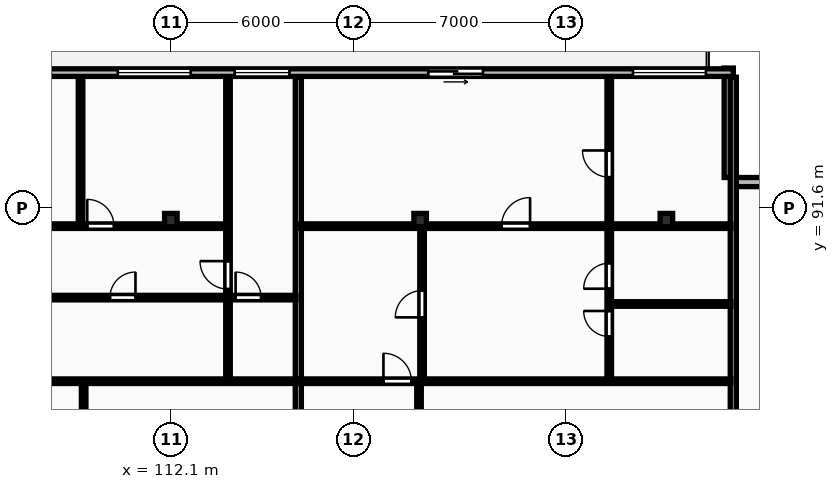
"""IFC4 building model, lengths in metres.
Left out: names, types, materials, properties, quantities, classifications, styles, units other than length and angle.
Written with IfcOpenShell. Run it as: python <this file> out.ifc"""

import sys

from ifc_helpers import new_model, si_unit, direction, frame, frame_2d, origin, origin_2d, place, context, subcontext, project, spatial, rectangle, i_section, extrude, element, fill, save


model = new_model("IFC4")
c1 = context("Model", 3, precision=1e-05, world=origin(), true_north=direction((0.0, 1.0)))
c2 = subcontext(c1, "Body", "Model", "MODEL_VIEW")
j1 = project(units=[si_unit("LENGTHUNIT", "METRE"), si_unit("PLANEANGLEUNIT", "RADIAN")], contexts=[c1])
p1 = place(None, origin())
s1 = spatial("IfcSite", under=j1, at=p1, CompositionType="ELEMENT")
p2 = place(p1, origin())
s2 = spatial("IfcBuilding", under=s1, at=p2, CompositionType="ELEMENT")
p3 = place(p2, frame((0.0, 0.0, 139.3)))
s3 = spatial("IfcBuildingStorey", under=s2, at=p3, CompositionType="ELEMENT", Elevation=139.3)
for number, where, z_axis, x_axis in (
    (1, (112.1, 91.2, 0.0), (0.0, 0.0, 1.0), (1.0, 0.0, 0.0)),
    (2, (120.3, 91.2, 0.0), (0.0, 0.0, 1.0), (1.0, 0.0, 0.0)),
    (3, (128.4, 91.2, 0.0), (0.0, 0.0, 1.0), (1.0, 0.0, 0.0)),
):
    element("IfcColumn", number, at=place(p3, frame(where, z_axis=z_axis, x_axis=x_axis)), inside=s3, PredefinedType="COLUMN", context=c2, shape_type="SweptSolid", body=[
        extrude(i_section(OverallWidth=0.412, OverallDepth=0.437, WebThickness=0.036, FlangeThickness=0.052, FilletRadius=0.015, at=origin_2d()), origin(), (0.0, 0.0, 1.0), 3.6),
    ])
for number, where, z_axis, x_axis in (
    (4, (134.2, 92.45, 0.0), (0.0, 0.0, 1.0), (-1.0, 0.0, 0.0)),
    (5, (130.45, 92.6, 0.0), (0.0, 0.0, 1.0), (0.0, 1.0, 0.0)),
):
    element("IfcWall", number, at=place(p3, frame(where, z_axis=z_axis, x_axis=x_axis)), inside=s3, PredefinedType="STANDARD", context=c2, shape_type="SweptSolid", body=[
        extrude(rectangle(XDim=3.6, YDim=0.3, at=frame_2d((1.8, 0.0))), origin(), (0.0, 0.0, 1.0), 3.31),
    ])
p4 = place(p3, frame((130.6, 96.05, 0.0), z_axis=(0.0, 0.0, 1.0), x_axis=(-1.0, 0.0, 0.0)))
e6 = element("IfcWall", 6, at=p4, inside=s3, PredefinedType="STANDARD", context=c2, shape_type="SweptSolid", body=[
    extrude(rectangle(XDim=73.0, YDim=0.25, at=frame_2d((36.5, 0.0))), origin(), (0.0, 0.0, 1.0), 3.31),
])
p5 = place(p4, frame((67.921, 0.0, 0.0)))
e7 = element("IfcOpeningElement", 7, at=p5, cuts=e6, PredefinedType="OPENING", context=c2, shape_type="SweptSolid", body=[
    extrude(rectangle(XDim=1.8, YDim=2.2, at=frame_2d((0.9, 1.1))), frame((0.0, 0.135, 0.0), z_axis=(0.0, -1.0, 0.0), x_axis=(1.0, 0.0, 0.0)), (0.0, 0.0, 1.0), 0.27),
])
p6 = place(p4, frame((58.084, 0.0, 0.85)))
e8 = element("IfcOpeningElement", 8, at=p6, cuts=e6, PredefinedType="OPENING", context=c2, shape_type="SweptSolid", body=[
    extrude(rectangle(XDim=2.4, YDim=1.9, at=frame_2d((1.2, 0.95))), frame((0.0, 0.135, 0.0), z_axis=(0.0, -1.0, 0.0), x_axis=(1.0, 0.0, 0.0)), (0.0, 0.0, 1.0), 0.27),
])
p7 = place(p4, frame((48.101, 0.0, 0.0)))
e9 = element("IfcOpeningElement", 9, at=p7, cuts=e6, PredefinedType="OPENING", context=c2, shape_type="SweptSolid", body=[
    extrude(rectangle(XDim=1.8, YDim=2.2, at=frame_2d((0.9, 1.1))), frame((0.0, 0.135, 0.0), z_axis=(0.0, -1.0, 0.0), x_axis=(1.0, 0.0, 0.0)), (0.0, 0.0, 1.0), 0.27),
])
p8 = place(p4, frame((37.368, 0.0, 0.85)))
e10 = element("IfcOpeningElement", 10, at=p8, cuts=e6, PredefinedType="OPENING", context=c2, shape_type="SweptSolid", body=[
    extrude(rectangle(XDim=2.4, YDim=1.9, at=frame_2d((1.2, 0.95))), frame((0.0, 0.135, 0.0), z_axis=(0.0, -1.0, 0.0), x_axis=(1.0, 0.0, 0.0)), (0.0, 0.0, 1.0), 0.27),
])
p9 = place(p4, frame((22.445, 0.0, 0.85)))
e11 = element("IfcOpeningElement", 11, at=p9, cuts=e6, PredefinedType="OPENING", context=c2, shape_type="SweptSolid", body=[
    extrude(rectangle(XDim=2.4, YDim=1.9, at=frame_2d((1.2, 0.95))), frame((0.0, 0.135, 0.0), z_axis=(0.0, -1.0, 0.0), x_axis=(1.0, 0.0, 0.0)), (0.0, 0.0, 1.0), 0.27),
])
p10 = place(p4, frame((17.845, 0.0, 0.85)))
e12 = element("IfcOpeningElement", 12, at=p10, cuts=e6, PredefinedType="OPENING", context=c2, shape_type="SweptSolid", body=[
    extrude(rectangle(XDim=2.4, YDim=1.9, at=frame_2d((1.2, 0.95))), frame((0.0, 0.135, 0.0), z_axis=(0.0, -1.0, 0.0), x_axis=(1.0, 0.0, 0.0)), (0.0, 0.0, 1.0), 0.27),
])
p11 = place(p4, frame((28.239, 0.0, 0.0)))
e13 = element("IfcOpeningElement", 13, at=p11, cuts=e6, PredefinedType="OPENING", context=c2, shape_type="SweptSolid", body=[
    extrude(rectangle(XDim=1.8, YDim=2.2, at=frame_2d((0.9, 1.1))), frame((0.0, 0.135, 0.0), z_axis=(0.0, -1.0, 0.0), x_axis=(1.0, 0.0, 0.0)), (0.0, 0.0, 1.0), 0.27),
])
p12 = place(p4, frame((14.599, 0.0, 0.85)))
e14 = element("IfcOpeningElement", 14, at=p12, cuts=e6, PredefinedType="OPENING", context=c2, shape_type="SweptSolid", body=[
    extrude(rectangle(XDim=1.8, YDim=1.8, at=frame_2d((0.9, 0.9))), frame((0.0, 0.135, 0.0), z_axis=(0.0, -1.0, 0.0), x_axis=(1.0, 0.0, 0.0)), (0.0, 0.0, 1.0), 0.27),
])
p13 = place(p4, frame((8.234, 0.0, 0.0)))
e15 = element("IfcOpeningElement", 15, at=p13, cuts=e6, PredefinedType="OPENING", context=c2, shape_type="SweptSolid", body=[
    extrude(rectangle(XDim=1.8, YDim=2.2, at=frame_2d((0.9, 1.1))), frame((0.0, 0.135, 0.0), z_axis=(0.0, -1.0, 0.0), x_axis=(1.0, 0.0, 0.0)), (0.0, 0.0, 1.0), 0.27),
])
p14 = place(p4, frame((0.9, 0.0, 0.85)))
e16 = element("IfcOpeningElement", 16, at=p14, cuts=e6, PredefinedType="OPENING", context=c2, shape_type="SweptSolid", body=[
    extrude(rectangle(XDim=2.4, YDim=1.9, at=frame_2d((1.2, 0.95))), frame((0.0, 0.135, 0.0), z_axis=(0.0, -1.0, 0.0), x_axis=(1.0, 0.0, 0.0)), (0.0, 0.0, 1.0), 0.27),
])
for number, where, z_axis, x_axis in (
    (17, (130.6, 69.83, 0.0), (0.0, 0.0, 1.0), (0.0, 1.0, 0.0)),
    (18, (116.293, 69.83, 0.0), (0.0, 0.0, 1.0), (0.0, 1.0, 0.0)),
):
    element("IfcWall", number, at=place(p3, frame(where, z_axis=z_axis, x_axis=x_axis)), inside=s3, PredefinedType="PARTITIONING", context=c2, shape_type="SweptSolid", body=[
        extrude(rectangle(XDim=26.07, YDim=0.2, at=frame_2d((13.035, 0.0))), origin(), (0.0, 0.0, 1.0), 3.31),
    ])
p15 = place(p3, frame((109.232, 69.81, 0.0), z_axis=(0.0, 0.0, 1.0), x_axis=(0.0, 1.0, 0.0)))
e19 = element("IfcWall", 19, at=p15, inside=s3, PredefinedType="PARTITIONING", context=c2, shape_type="SweptSolid", body=[
    extrude(rectangle(XDim=16.05, YDim=0.15, at=frame_2d((8.025, 0.0))), origin(), (0.0, 0.0, 1.0), 3.31),
])
p16 = place(p15, frame((6.755, 0.0, 0.0)))
e20 = element("IfcOpeningElement", 20, at=p16, cuts=e19, PredefinedType="OPENING", context=c2, shape_type="SweptSolid", body=[
    extrude(rectangle(XDim=0.84, YDim=2.04, at=frame_2d((0.42, 1.02))), frame((0.0, 0.085, 0.0), z_axis=(0.0, -1.0, 0.0), x_axis=(1.0, 0.0, 0.0)), (0.0, 0.0, 1.0), 0.17),
])
p17 = place(p15, frame((8.095, 0.0, 0.0)))
e21 = element("IfcOpeningElement", 21, at=p17, cuts=e19, PredefinedType="OPENING", context=c2, shape_type="SweptSolid", body=[
    extrude(rectangle(XDim=0.88, YDim=2.06, at=frame_2d((0.44, 1.03))), frame((0.0, 0.085, 0.0), z_axis=(0.0, -1.0, 0.0), x_axis=(1.0, 0.0, 0.0)), (0.0, 0.0, 1.0), 0.17),
])
p18 = place(p3, frame((109.13, 91.08, 0.0), z_axis=(0.0, 0.0, 1.0), x_axis=(0.0, 1.0, 0.0)))
e22 = element("IfcWall", 22, at=p18, inside=s3, PredefinedType="PARTITIONING", context=c2, shape_type="SweptSolid", body=[
    extrude(rectangle(XDim=4.82, YDim=0.15, at=frame_2d((2.41, 0.0))), origin(), (0.0, 0.0, 1.0), 3.31),
])
p19 = place(p3, frame((113.98, 85.94, 0.0), z_axis=(0.0, 0.0, 1.0), x_axis=(0.0, 1.0, 0.0)))
e23 = element("IfcWall", 23, at=p19, inside=s3, PredefinedType="PARTITIONING", context=c2, shape_type="SweptSolid", body=[
    extrude(rectangle(XDim=2.69, YDim=0.15, at=frame_2d((1.345, 0.0))), origin(), (0.0, 0.0, 1.0), 3.31),
])
p20 = place(p3, frame((113.98, 88.67, 0.0), z_axis=(0.0, 0.0, 1.0), x_axis=(0.0, 1.0, 0.0)))
e24 = element("IfcWall", 24, at=p20, inside=s3, PredefinedType="PARTITIONING", context=c2, shape_type="SweptSolid", body=[
    extrude(rectangle(XDim=7.23, YDim=0.15, at=frame_2d((3.615, 0.0))), origin(), (0.0, 0.0, 1.0), 3.31),
])
p21 = place(p20, frame((0.26, 0.0, 0.0)))
e25 = element("IfcOpeningElement", 25, at=p21, cuts=e24, PredefinedType="OPENING", context=c2, shape_type="SweptSolid", body=[
    extrude(rectangle(XDim=0.92, YDim=2.08, at=frame_2d((0.46, 1.04))), frame((0.0, 0.085, 0.0), z_axis=(0.0, -1.0, 0.0), x_axis=(1.0, 0.0, 0.0)), (0.0, 0.0, 1.0), 0.17),
])
p22 = place(p3, frame((104.82, 88.65, 0.0), z_axis=(0.0, 0.0, 1.0), x_axis=(1.0, 0.0, 0.0)))
e26 = element("IfcWall", 26, at=p22, inside=s3, PredefinedType="PARTITIONING", context=c2, shape_type="SweptSolid", body=[
    extrude(rectangle(XDim=11.393, YDim=0.15, at=frame_2d((5.696, 0.0))), origin(), (0.0, 0.0, 1.0), 3.31),
])
p23 = place(p22, frame((1.21, 0.0, 0.0)))
e27 = element("IfcOpeningElement", 27, at=p23, cuts=e26, PredefinedType="OPENING", context=c2, shape_type="SweptSolid", body=[
    extrude(rectangle(XDim=0.84, YDim=2.04, at=frame_2d((0.42, 1.02))), frame((0.0, 0.085, 0.0), z_axis=(0.0, -1.0, 0.0), x_axis=(1.0, 0.0, 0.0)), (0.0, 0.0, 1.0), 0.17),
])
p24 = place(p22, frame((5.276, 0.0, 0.0)))
e28 = element("IfcOpeningElement", 28, at=p24, cuts=e26, PredefinedType="OPENING", context=c2, shape_type="SweptSolid", body=[
    extrude(rectangle(XDim=0.84, YDim=2.04, at=frame_2d((0.42, 1.02))), frame((0.0, 0.085, 0.0), z_axis=(0.0, -1.0, 0.0), x_axis=(1.0, 0.0, 0.0)), (0.0, 0.0, 1.0), 0.17),
])
p25 = place(p22, frame((9.41, 0.0, 0.0)))
e29 = element("IfcOpeningElement", 29, at=p25, cuts=e26, PredefinedType="OPENING", context=c2, shape_type="SweptSolid", body=[
    extrude(rectangle(XDim=0.84, YDim=2.04, at=frame_2d((0.42, 1.02))), frame((0.0, 0.085, 0.0), z_axis=(0.0, -1.0, 0.0), x_axis=(1.0, 0.0, 0.0)), (0.0, 0.0, 1.0), 0.17),
])
p26 = place(p3, frame((98.101, 85.9, 0.0), z_axis=(0.0, 0.0, 1.0), x_axis=(1.0, 0.0, 0.0)))
e30 = element("IfcWall", 30, at=p26, inside=s3, PredefinedType="PARTITIONING", context=c2, shape_type="SweptSolid", body=[
    extrude(rectangle(XDim=18.112, YDim=0.15, at=frame_2d((9.056, 0.0))), origin(), (0.0, 0.0, 1.0), 3.31),
])
p27 = place(p26, frame((2.72, 0.0, 0.0)))
e31 = element("IfcOpeningElement", 31, at=p27, cuts=e30, PredefinedType="OPENING", context=c2, shape_type="SweptSolid", body=[
    extrude(rectangle(XDim=0.92, YDim=2.08, at=frame_2d((0.46, 1.04))), frame((0.0, 0.085, 0.0), z_axis=(0.0, -1.0, 0.0), x_axis=(1.0, 0.0, 0.0)), (0.0, 0.0, 1.0), 0.17),
])
p28 = place(p3, frame((98.101, 91.0, 0.0), z_axis=(0.0, 0.0, 1.0), x_axis=(1.0, 0.0, 0.0)))
e32 = element("IfcWall", 32, at=p28, inside=s3, PredefinedType="PARTITIONING", context=c2, shape_type="SweptSolid", body=[
    extrude(rectangle(XDim=15.879, YDim=0.15, at=frame_2d((7.939, 0.0))), origin(), (0.0, 0.0, 1.0), 3.003),
])
p29 = place(p28, frame((2.45, 0.0, 0.0)))
e33 = element("IfcOpeningElement", 33, at=p29, cuts=e32, PredefinedType="OPENING", context=c2, shape_type="SweptSolid", body=[
    extrude(rectangle(XDim=0.94, YDim=2.1, at=frame_2d((0.47, 1.05))), frame((0.0, 0.085, 0.0), z_axis=(0.0, -1.0, 0.0), x_axis=(1.0, 0.0, 0.0)), (0.0, 0.0, 1.0), 0.17),
])
p30 = place(p28, frame((7.499, 0.0, 0.0)))
e34 = element("IfcOpeningElement", 34, at=p30, cuts=e32, PredefinedType="OPENING", context=c2, shape_type="SweptSolid", body=[
    extrude(rectangle(XDim=0.88, YDim=2.06, at=frame_2d((0.44, 1.03))), frame((0.0, 0.085, 0.0), z_axis=(0.0, -1.0, 0.0), x_axis=(1.0, 0.0, 0.0)), (0.0, 0.0, 1.0), 0.17),
])
p31 = place(p28, frame((11.249, 0.0, 0.0)))
e35 = element("IfcOpeningElement", 35, at=p31, cuts=e32, PredefinedType="OPENING", context=c2, shape_type="SweptSolid", body=[
    extrude(rectangle(XDim=0.88, YDim=2.06, at=frame_2d((0.44, 1.03))), frame((0.0, 0.085, 0.0), z_axis=(0.0, -1.0, 0.0), x_axis=(1.0, 0.0, 0.0)), (0.0, 0.0, 1.0), 0.17),
])
p32 = place(p3, frame((120.263, 69.81, 0.0), z_axis=(0.0, 0.0, 1.0), x_axis=(0.0, 1.0, 0.0)))
e36 = element("IfcWall", 36, at=p32, inside=s3, PredefinedType="PARTITIONING", context=c2, shape_type="SweptSolid", body=[
    extrude(rectangle(XDim=16.05, YDim=0.15, at=frame_2d((8.025, 0.0))), origin(), (0.0, 0.0, 1.0), 2.617),
])
p33 = place(p32, frame((6.895, 0.0, 0.0)))
e37 = element("IfcOpeningElement", 37, at=p33, cuts=e36, PredefinedType="OPENING", context=c2, shape_type="SweptSolid", body=[
    extrude(rectangle(XDim=0.88, YDim=2.06, at=frame_2d((0.44, 1.03))), frame((0.0, 0.085, 0.0), z_axis=(0.0, -1.0, 0.0), x_axis=(1.0, 0.0, 0.0)), (0.0, 0.0, 1.0), 0.17),
])
p34 = place(p3, frame((120.363, 85.94, 0.0), z_axis=(0.0, 0.0, 1.0), x_axis=(0.0, 1.0, 0.0)))
e38 = element("IfcWall", 38, at=p34, inside=s3, PredefinedType="PARTITIONING", context=c2, shape_type="SweptSolid", body=[
    extrude(rectangle(XDim=5.0, YDim=0.15, at=frame_2d((2.5, 0.0))), origin(), (0.0, 0.0, 1.0), 2.617),
])
p35 = place(p34, frame((2.06, 0.0, 0.0)))
e39 = element("IfcOpeningElement", 39, at=p35, cuts=e38, PredefinedType="OPENING", context=c2, shape_type="SweptSolid", body=[
    extrude(rectangle(XDim=0.88, YDim=2.06, at=frame_2d((0.44, 1.03))), frame((0.0, 0.085, 0.0), z_axis=(0.0, -1.0, 0.0), x_axis=(1.0, 0.0, 0.0)), (0.0, 0.0, 1.0), 0.17),
])
p36 = place(p3, frame((126.58, 88.44, 0.0), z_axis=(0.0, 0.0, 1.0), x_axis=(1.0, 0.0, 0.0)))
e40 = element("IfcWall", 40, at=p36, inside=s3, PredefinedType="PARTITIONING", context=c2, shape_type="SweptSolid", body=[
    extrude(rectangle(XDim=3.94, YDim=0.15, at=frame_2d((1.97, 0.0))), origin(), (0.0, 0.0, 1.0), 3.31),
])
p37 = place(p3, frame((126.52, 85.94, 0.0), z_axis=(0.0, 0.0, 1.0), x_axis=(0.0, 1.0, 0.0)))
e41 = element("IfcWall", 41, at=p37, inside=s3, PredefinedType="PARTITIONING", context=c2, shape_type="SweptSolid", body=[
    extrude(rectangle(XDim=9.96, YDim=0.15, at=frame_2d((4.98, 0.0))), origin(), (0.0, 0.0, 1.0), 3.31),
])
p38 = place(p37, frame((1.43, 0.0, 0.0)))
e42 = element("IfcOpeningElement", 42, at=p38, cuts=e41, PredefinedType="OPENING", context=c2, shape_type="SweptSolid", body=[
    extrude(rectangle(XDim=0.84, YDim=2.04, at=frame_2d((0.42, 1.02))), frame((0.0, 0.085, 0.0), z_axis=(0.0, -1.0, 0.0), x_axis=(1.0, 0.0, 0.0)), (0.0, 0.0, 1.0), 0.17),
])
p39 = place(p37, frame((3.002, 0.0, 0.0)))
e43 = element("IfcOpeningElement", 43, at=p39, cuts=e41, PredefinedType="OPENING", context=c2, shape_type="SweptSolid", body=[
    extrude(rectangle(XDim=0.84, YDim=2.04, at=frame_2d((0.42, 1.02))), frame((0.0, 0.085, 0.0), z_axis=(0.0, -1.0, 0.0), x_axis=(1.0, 0.0, 0.0)), (0.0, 0.0, 1.0), 0.17),
])
p40 = place(p37, frame((6.669, 0.0, 0.0)))
e44 = element("IfcOpeningElement", 44, at=p40, cuts=e41, PredefinedType="OPENING", context=c2, shape_type="SweptSolid", body=[
    extrude(rectangle(XDim=0.88, YDim=2.06, at=frame_2d((0.44, 1.03))), frame((0.0, 0.085, 0.0), z_axis=(0.0, -1.0, 0.0), x_axis=(1.0, 0.0, 0.0)), (0.0, 0.0, 1.0), 0.17),
])
p41 = place(p3, frame((116.373, 85.9, 0.0), z_axis=(0.0, 0.0, 1.0), x_axis=(1.0, 0.0, 0.0)))
e45 = element("IfcWall", 45, at=p41, inside=s3, PredefinedType="PARTITIONING", context=c2, shape_type="SweptSolid", body=[
    extrude(rectangle(XDim=14.147, YDim=0.15, at=frame_2d((7.074, 0.0))), origin(), (0.0, 0.0, 1.0), 3.31),
])
p42 = place(p41, frame((2.72, 0.0, 0.0)))
e46 = element("IfcOpeningElement", 46, at=p42, cuts=e45, PredefinedType="OPENING", context=c2, shape_type="SweptSolid", body=[
    extrude(rectangle(XDim=0.92, YDim=2.08, at=frame_2d((0.46, 1.04))), frame((0.0, 0.085, 0.0), z_axis=(0.0, -1.0, 0.0), x_axis=(1.0, 0.0, 0.0)), (0.0, 0.0, 1.0), 0.17),
])
p43 = place(p3, frame((116.373, 91.0, 0.0), z_axis=(0.0, 0.0, 1.0), x_axis=(1.0, 0.0, 0.0)))
e47 = element("IfcWall", 47, at=p43, inside=s3, PredefinedType="PARTITIONING", context=c2, shape_type="SweptSolid", body=[
    extrude(rectangle(XDim=14.147, YDim=0.15, at=frame_2d((7.074, 0.0))), origin(), (0.0, 0.0, 1.0), 3.003),
])
p44 = place(p43, frame((6.604, 0.0, 0.0)))
e48 = element("IfcOpeningElement", 48, at=p44, cuts=e47, PredefinedType="OPENING", context=c2, shape_type="SweptSolid", body=[
    extrude(rectangle(XDim=0.94, YDim=2.1, at=frame_2d((0.47, 1.05))), frame((0.0, 0.085, 0.0), z_axis=(0.0, -1.0, 0.0), x_axis=(1.0, 0.0, 0.0)), (0.0, 0.0, 1.0), 0.17),
])
p45 = place(p10, origin())
e49 = element("IfcWindow", 49, at=p45, inside=s3, PartitioningType="DOUBLE_PANEL_VERTICAL", PredefinedType="WINDOW", context=c2, shape_type="SweptSolid", body=[
    extrude(rectangle(XDim=2.4, YDim=1.9, at=frame_2d((1.2, 0.95))), frame((0.0, 0.03, 0.0), z_axis=(0.0, -1.0, 0.0), x_axis=(1.0, 0.0, 0.0)), (0.0, 0.0, 1.0), 0.06),
])
fill(e12, e49)
p46 = place(p12, origin())
e50 = element("IfcWindow", 50, at=p46, inside=s3, PartitioningType="SINGLE_PANEL", PredefinedType="WINDOW", context=c2, shape_type="SweptSolid", body=[
    extrude(rectangle(XDim=1.8, YDim=1.8, at=frame_2d((0.9, 0.9))), frame((0.0, 0.03, 0.0), z_axis=(0.0, -1.0, 0.0), x_axis=(1.0, 0.0, 0.0)), (0.0, 0.0, 1.0), 0.06),
])
fill(e14, e50)
p47 = place(p13, origin())
e51 = element("IfcDoor", 51, at=p47, inside=s3, OperationType="SLIDING_TO_LEFT", PredefinedType="DOOR", context=c2, shape_type="SweptSolid", body=[
    extrude(rectangle(XDim=1.8, YDim=2.2, at=frame_2d((0.9, 1.1))), frame((0.0, 0.025, 0.0), z_axis=(0.0, -1.0, 0.0), x_axis=(1.0, 0.0, 0.0)), (0.0, 0.0, 1.0), 0.05),
])
fill(e15, e51)
p48 = place(p14, origin())
e52 = element("IfcWindow", 52, at=p48, inside=s3, PartitioningType="DOUBLE_PANEL_VERTICAL", PredefinedType="WINDOW", context=c2, shape_type="SweptSolid", body=[
    extrude(rectangle(XDim=2.4, YDim=1.9, at=frame_2d((1.2, 0.95))), frame((0.0, 0.03, 0.0), z_axis=(0.0, -1.0, 0.0), x_axis=(1.0, 0.0, 0.0)), (0.0, 0.0, 1.0), 0.06),
])
fill(e16, e52)
p49 = place(p21, origin())
e53 = element("IfcDoor", 53, at=p49, inside=s3, OperationType="SINGLE_SWING_RIGHT", PredefinedType="DOOR", context=c2, shape_type="SweptSolid", body=[
    extrude(rectangle(XDim=0.92, YDim=2.08, at=frame_2d((0.46, 1.04))), frame((0.0, 0.025, 0.0), z_axis=(0.0, -1.0, 0.0), x_axis=(1.0, 0.0, 0.0)), (0.0, 0.0, 1.0), 0.05),
])
fill(e25, e53)
p50 = place(p24, origin())
e54 = element("IfcDoor", 54, at=p50, inside=s3, OperationType="SINGLE_SWING_RIGHT", PredefinedType="DOOR", context=c2, shape_type="SweptSolid", body=[
    extrude(rectangle(XDim=0.84, YDim=2.04, at=frame_2d((0.42, 1.02))), frame((0.0, 0.025, 0.0), z_axis=(0.0, -1.0, 0.0), x_axis=(1.0, 0.0, 0.0)), (0.0, 0.0, 1.0), 0.05),
])
fill(e28, e54)
p51 = place(p25, origin())
e55 = element("IfcDoor", 55, at=p51, inside=s3, OperationType="SINGLE_SWING_LEFT", PredefinedType="DOOR", context=c2, shape_type="SweptSolid", body=[
    extrude(rectangle(XDim=0.84, YDim=2.04, at=frame_2d((0.42, 1.02))), frame((0.0, 0.025, 0.0), z_axis=(0.0, -1.0, 0.0), x_axis=(1.0, 0.0, 0.0)), (0.0, 0.0, 1.0), 0.05),
])
fill(e29, e55)
p52 = place(p31, origin())
e56 = element("IfcDoor", 56, at=p52, inside=s3, OperationType="SINGLE_SWING_LEFT", PredefinedType="DOOR", context=c2, shape_type="SweptSolid", body=[
    extrude(rectangle(XDim=0.88, YDim=2.06, at=frame_2d((0.44, 1.03))), frame((0.0, 0.025, 0.0), z_axis=(0.0, -1.0, 0.0), x_axis=(1.0, 0.0, 0.0)), (0.0, 0.0, 1.0), 0.05),
])
fill(e35, e56)
p53 = place(p35, origin())
e57 = element("IfcDoor", 57, at=p53, inside=s3, OperationType="SINGLE_SWING_LEFT", PredefinedType="DOOR", context=c2, shape_type="SweptSolid", body=[
    extrude(rectangle(XDim=0.88, YDim=2.06, at=frame_2d((0.44, 1.03))), frame((0.0, 0.025, 0.0), z_axis=(0.0, -1.0, 0.0), x_axis=(1.0, 0.0, 0.0)), (0.0, 0.0, 1.0), 0.05),
])
fill(e39, e57)
p54 = place(p38, origin())
e58 = element("IfcDoor", 58, at=p54, inside=s3, OperationType="SINGLE_SWING_RIGHT", PredefinedType="DOOR", context=c2, shape_type="SweptSolid", body=[
    extrude(rectangle(XDim=0.84, YDim=2.04, at=frame_2d((0.42, 1.02))), frame((0.0, 0.025, 0.0), z_axis=(0.0, -1.0, 0.0), x_axis=(1.0, 0.0, 0.0)), (0.0, 0.0, 1.0), 0.05),
])
fill(e42, e58)
p55 = place(p39, origin())
e59 = element("IfcDoor", 59, at=p55, inside=s3, OperationType="SINGLE_SWING_LEFT", PredefinedType="DOOR", context=c2, shape_type="SweptSolid", body=[
    extrude(rectangle(XDim=0.84, YDim=2.04, at=frame_2d((0.42, 1.02))), frame((0.0, 0.025, 0.0), z_axis=(0.0, -1.0, 0.0), x_axis=(1.0, 0.0, 0.0)), (0.0, 0.0, 1.0), 0.05),
])
fill(e43, e59)
p56 = place(p40, origin())
e60 = element("IfcDoor", 60, at=p56, inside=s3, OperationType="SINGLE_SWING_RIGHT", PredefinedType="DOOR", context=c2, shape_type="SweptSolid", body=[
    extrude(rectangle(XDim=0.88, YDim=2.06, at=frame_2d((0.44, 1.03))), frame((0.0, 0.025, 0.0), z_axis=(0.0, -1.0, 0.0), x_axis=(1.0, 0.0, 0.0)), (0.0, 0.0, 1.0), 0.05),
])
fill(e44, e60)
p57 = place(p42, origin())
e61 = element("IfcDoor", 61, at=p57, inside=s3, OperationType="SINGLE_SWING_LEFT", PredefinedType="DOOR", context=c2, shape_type="SweptSolid", body=[
    extrude(rectangle(XDim=0.92, YDim=2.08, at=frame_2d((0.46, 1.04))), frame((0.0, 0.025, 0.0), z_axis=(0.0, -1.0, 0.0), x_axis=(1.0, 0.0, 0.0)), (0.0, 0.0, 1.0), 0.05),
])
fill(e46, e61)
p58 = place(p44, origin())
e62 = element("IfcDoor", 62, at=p58, inside=s3, OperationType="SINGLE_SWING_RIGHT", PredefinedType="DOOR", context=c2, shape_type="SweptSolid", body=[
    extrude(rectangle(XDim=0.94, YDim=2.1, at=frame_2d((0.47, 1.05))), frame((0.0, 0.025, 0.0), z_axis=(0.0, -1.0, 0.0), x_axis=(1.0, 0.0, 0.0)), (0.0, 0.0, 1.0), 0.05),
])
fill(e48, e62)
save(model, sys.argv[1])
